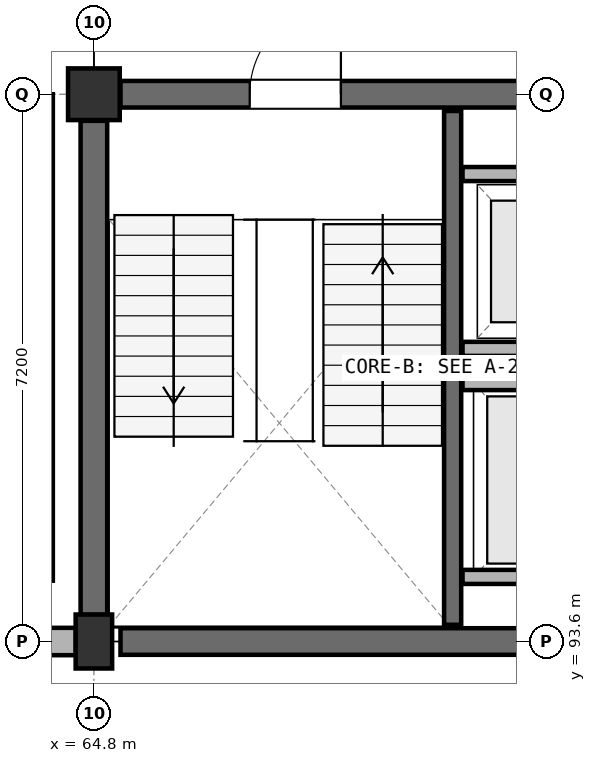
"""IFC4 building model, lengths in metres.
Left out: names, types, materials, properties, quantities, classifications, styles, units other than length and angle.
Written with IfcOpenShell. Run it as: python <this file> out.ifc"""

import sys

from ifc_helpers import new_model, si_unit, direction, frame, frame_2d, origin, origin_2d, place, context, subcontext, project, spatial, rectangle, extrude, element, fill, save


model = new_model("IFC4")
c1 = context("Model", 3, precision=1e-05, world=origin(), true_north=direction((0.0, 1.0)))
c2 = subcontext(c1, "Body", "Model", "MODEL_VIEW")
j1 = project(units=[si_unit("LENGTHUNIT", "METRE"), si_unit("PLANEANGLEUNIT", "RADIAN")], contexts=[c1])
p1 = place(None, origin())
s1 = spatial("IfcSite", under=j1, at=p1, CompositionType="ELEMENT")
p2 = place(p1, origin())
s2 = spatial("IfcBuilding", under=s1, at=p2, CompositionType="ELEMENT")
p3 = place(p2, frame((0.0, 0.0, 26.4)))
s3 = spatial("IfcBuildingStorey", under=s2, at=p3, CompositionType="ELEMENT", Elevation=26.4)
p4 = place(p3, frame((64.8, 93.6, 0.0), z_axis=(0.0, 0.0, 1.0), x_axis=(1.0, 0.0, 0.0)))
e1 = element("IfcColumn", 1, at=p4, inside=s3, PredefinedType="COLUMN", context=c2, shape_type="SweptSolid", body=[
    extrude(rectangle(XDim=0.48, YDim=0.71, at=origin_2d()), origin(), (0.0, 0.0, 1.0), 3.9),
])
p5 = place(p3, frame((64.8, 100.8, 0.0), z_axis=(0.0, 0.0, 1.0), x_axis=(1.0, 0.0, 0.0)))
e2 = element("IfcColumn", 2, at=p5, inside=s3, PredefinedType="COLUMN", context=c2, shape_type="SweptSolid", body=[
    extrude(rectangle(XDim=0.68, YDim=0.68, at=origin_2d()), origin(), (0.0, 0.0, 1.0), 3.9),
])
p6 = place(p3, frame((65.15, 93.6, 0.0), z_axis=(0.0, 0.0, 1.0), x_axis=(1.0, 0.0, 0.0)))
e3 = element("IfcWall", 3, at=p6, inside=s3, PredefinedType="SHEAR", context=c2, shape_type="SweptSolid", body=[
    extrude(rectangle(XDim=6.5, YDim=0.35, at=frame_2d((3.25, 0.0))), origin(), (0.0, 0.0, 1.0), 3.9),
])
p7 = place(p3, frame((71.65, 100.8, 0.0), z_axis=(0.0, 0.0, 1.0), x_axis=(-1.0, 0.0, 0.0)))
e4 = element("IfcWall", 4, at=p7, inside=s3, PredefinedType="SHEAR", context=c2, shape_type="SweptSolid", body=[
    extrude(rectangle(XDim=6.5, YDim=0.35, at=frame_2d((3.25, 0.0))), origin(), (0.0, 0.0, 1.0), 3.9),
])
p8 = place(p7, frame((3.6, 0.0, 0.0)))
e5 = element("IfcOpeningElement", 5, at=p8, cuts=e4, PredefinedType="OPENING", context=c2, shape_type="SweptSolid", body=[
    extrude(rectangle(XDim=1.2, YDim=2.2, at=frame_2d((0.6, 1.1))), frame((0.0, 0.185, 0.0), z_axis=(0.0, -1.0, 0.0), x_axis=(1.0, 0.0, 0.0)), (0.0, 0.0, 1.0), 0.37),
])
p9 = place(p3, frame((64.8, 100.45, 0.0), z_axis=(0.0, 0.0, 1.0), x_axis=(0.0, -1.0, 0.0)))
e6 = element("IfcWall", 6, at=p9, inside=s3, PredefinedType="SHEAR", context=c2, shape_type="SweptSolid", body=[
    extrude(rectangle(XDim=6.5, YDim=0.35, at=frame_2d((3.25, 0.0))), origin(), (0.0, 0.0, 1.0), 3.9),
])
p10 = place(p3, frame((69.52, 93.82, 0.0), z_axis=(0.0, 0.0, 1.0), x_axis=(0.0, 1.0, 0.0)))
e7 = element("IfcWall", 7, at=p10, inside=s3, PredefinedType="SHEAR", context=c2, shape_type="SweptSolid", body=[
    extrude(rectangle(XDim=6.76, YDim=0.225, at=frame_2d((3.38, 0.0))), origin(), (0.0, 0.0, 1.0), 3.9),
])
for number, where, z_axis, x_axis in (
    (8, (69.65, 94.45, 0.0), (0.0, 0.0, 1.0), (1.0, 0.0, 0.0)),
    (9, (69.65, 97.0, 0.0), (0.0, 0.0, 1.0), (1.0, 0.0, 0.0)),
    (10, (69.65, 97.45, 0.0), (0.0, 0.0, 1.0), (1.0, 0.0, 0.0)),
    (11, (69.65, 99.75, 0.0), (0.0, 0.0, 1.0), (1.0, 0.0, 0.0)),
):
    element("IfcWall", number, at=place(p3, frame(where, z_axis=z_axis, x_axis=x_axis)), inside=s3, PredefinedType="PARTITIONING", context=c2, shape_type="SweptSolid", body=[
        extrude(rectangle(XDim=2.1, YDim=0.185, at=frame_2d((1.05, 0.0))), origin(), (0.0, 0.0, 1.0), 3.9),
    ])
p11 = place(p3, frame((57.838, 93.6, 0.0), z_axis=(0.0, 0.0, 1.0), x_axis=(1.0, 0.0, 0.0)))
e12 = element("IfcWall", 12, at=p11, inside=s3, PredefinedType="SOLIDWALL", context=c2, shape_type="SweptSolid", body=[
    extrude(rectangle(XDim=6.724, YDim=0.36, at=frame_2d((3.362, 0.0))), origin(), (0.0, 0.0, 1.0), 2.74),
])
p12 = place(p11, frame((1.112, 0.0, 0.7)))
e13 = element("IfcOpeningElement", 13, at=p12, cuts=e12, PredefinedType="OPENING", context=c2, shape_type="SweptSolid", body=[
    extrude(rectangle(XDim=1.35, YDim=1.89, at=frame_2d((0.675, 0.945))), frame((0.0, 0.19, 0.0), z_axis=(0.0, -1.0, 0.0), x_axis=(1.0, 0.0, 0.0)), (0.0, 0.0, 1.0), 0.38),
])
p13 = place(p11, frame((4.312, 0.0, 0.7)))
e14 = element("IfcOpeningElement", 14, at=p13, cuts=e12, PredefinedType="OPENING", context=c2, shape_type="SweptSolid", body=[
    extrude(rectangle(XDim=1.05, YDim=1.89, at=frame_2d((0.525, 0.945))), frame((0.0, 0.19, 0.0), z_axis=(0.0, -1.0, 0.0), x_axis=(1.0, 0.0, 0.0)), (0.0, 0.0, 1.0), 0.38),
])
p14 = place(p3, frame((64.2, 100.8, 0.0), z_axis=(0.0, 0.0, 1.0), x_axis=(0.0, -1.0, 0.0)))
e15 = element("IfcWall", 15, at=p14, inside=s3, PredefinedType="PARTITIONING", context=c2, shape_type="SweptSolid", body=[
    extrude(rectangle(XDim=6.4, YDim=0.12, at=frame_2d((3.2, 0.0))), origin(), (0.0, 0.0, 1.0), 2.78),
])
p15 = place(p8, frame((1.2, 0.0, 0.0), z_axis=(0.0, 0.0, 1.0), x_axis=(-1.0, 0.0, 0.0)))
e16 = element("IfcDoor", 16, at=p15, inside=s3, OperationType="SINGLE_SWING_RIGHT", PredefinedType="DOOR", context=c2, shape_type="SweptSolid", body=[
    extrude(rectangle(XDim=1.2, YDim=2.2, at=frame_2d((0.6, 1.1))), frame((0.0, 0.025, 0.0), z_axis=(0.0, -1.0, 0.0), x_axis=(1.0, 0.0, 0.0)), (0.0, 0.0, 1.0), 0.05),
])
fill(e5, e16)
save(model, sys.argv[1])
